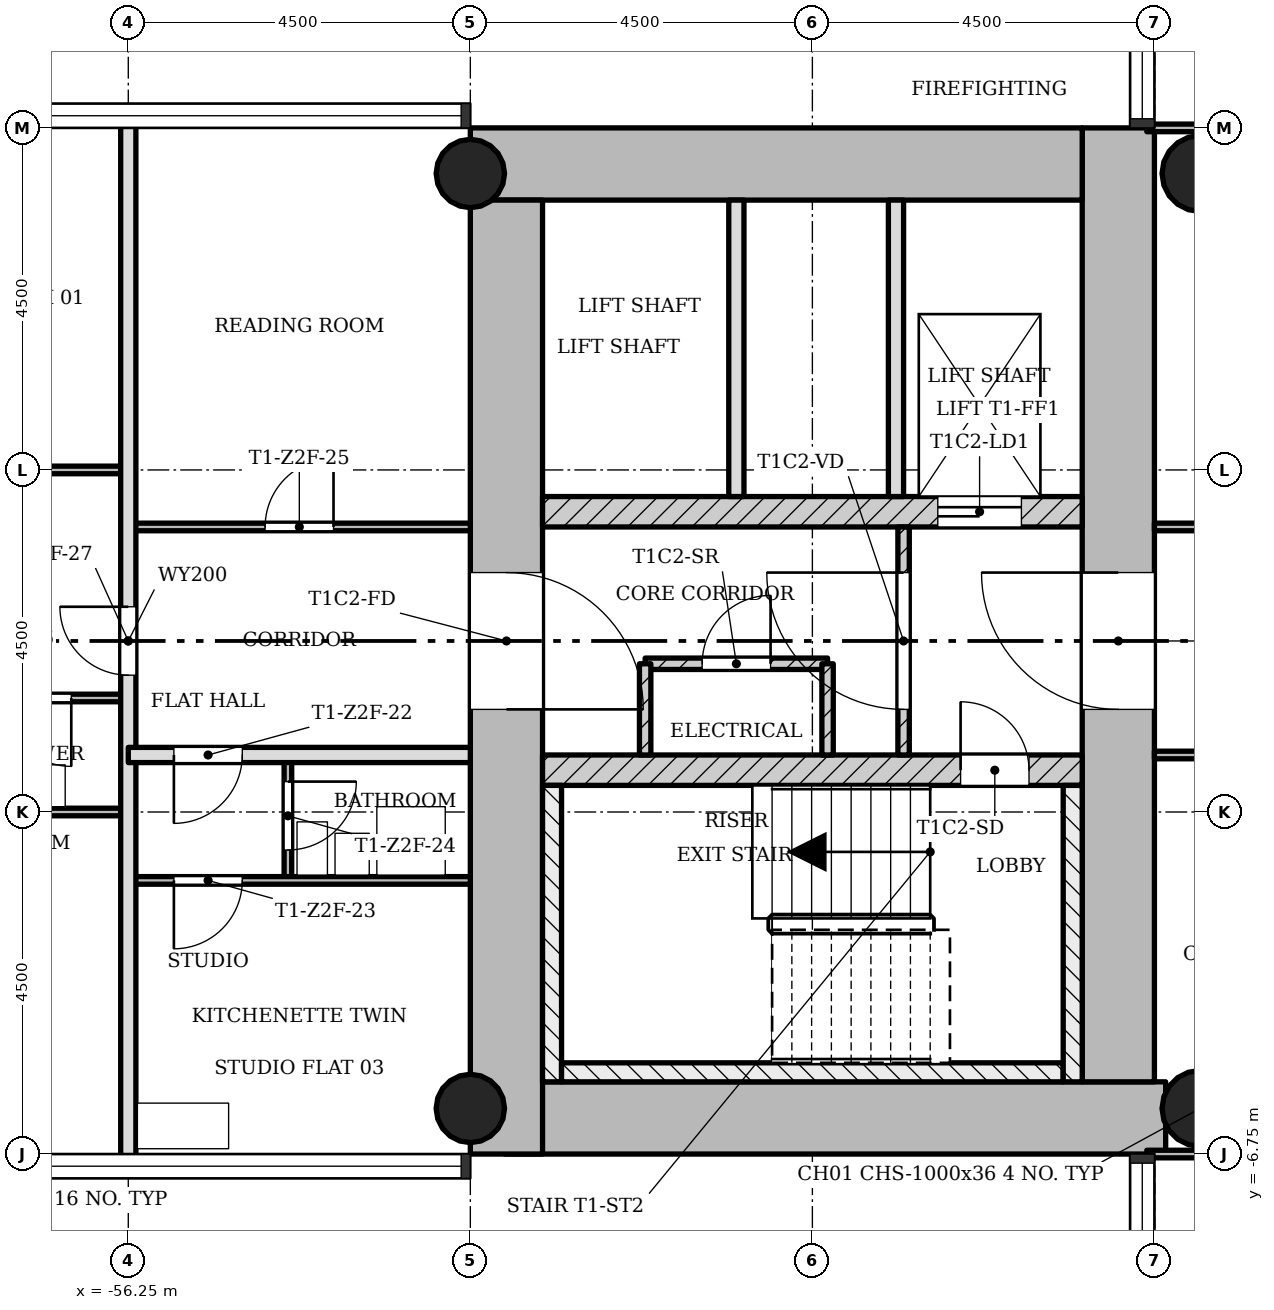
"""IFC4 building model, lengths in metres.
Left out: names, types, materials, properties, quantities, classifications, styles, units other than length and angle.
Written with IfcOpenShell. Run it as: python <this file> out.ifc"""

import sys

from ifc_helpers import new_model, si_unit, direction, frame, frame_2d, origin, origin_2d, place, context, subcontext, project, spatial, rectangle, hollow_circle, extrude, element, fill, save


model = new_model("IFC4")
c1 = context("Model", 3, precision=1e-05, world=origin(), true_north=direction((0.0, 1.0)))
c2 = subcontext(c1, "Body", "Model", "MODEL_VIEW")
j1 = project(units=[si_unit("LENGTHUNIT", "METRE"), si_unit("PLANEANGLEUNIT", "RADIAN")], contexts=[c1])
p1 = place(None, origin())
s1 = spatial("IfcSite", under=j1, at=p1, CompositionType="ELEMENT")
p2 = place(p1, origin())
s2 = spatial("IfcBuilding", under=s1, at=p2, CompositionType="ELEMENT")
p3 = place(p2, frame((0.0, 0.0, 110.6)))
s3 = spatial("IfcBuildingStorey", under=s2, at=p3, CompositionType="ELEMENT", Elevation=110.6)
p4 = place(p3, frame((-51.298, -6.275, 0.0), z_axis=(0.0, 0.0, 1.0), x_axis=(1.0, 0.0, 0.0)))
e1 = element("IfcWall", 1, at=p4, inside=s3, PredefinedType="SHEAR", context=c2, shape_type="SweptSolid", body=[
    extrude(rectangle(XDim=8.696, YDim=0.95, at=frame_2d((4.348, 0.0))), origin(), (0.0, 0.0, 1.0), 3.4),
])
p5 = place(p3, frame((-43.225, -5.8, 0.0), z_axis=(0.0, 0.0, 1.0), x_axis=(0.0, 1.0, 0.0)))
e2 = element("IfcWall", 2, at=p5, inside=s3, PredefinedType="SHEAR", context=c2, shape_type="SweptSolid", body=[
    extrude(rectangle(XDim=12.55, YDim=0.95, at=frame_2d((6.275, 0.0))), origin(), (0.0, 0.0, 1.0), 3.4),
])
p6 = place(p5, frame((4.9, 0.0, 0.0)))
e3 = element("IfcOpeningElement", 3, at=p6, cuts=e2, PredefinedType="OPENING", context=c2, shape_type="SweptSolid", body=[
    extrude(rectangle(XDim=1.8, YDim=2.1, at=frame_2d((0.9, 1.05))), frame((0.0, 0.485, 0.0), z_axis=(0.0, -1.0, 0.0), x_axis=(1.0, 0.0, 0.0)), (0.0, 0.0, 1.0), 0.97),
])
p7 = place(p3, frame((-43.7, 6.275, 0.0), z_axis=(0.0, 0.0, 1.0), x_axis=(-1.0, 0.0, 0.0)))
e4 = element("IfcWall", 4, at=p7, inside=s3, PredefinedType="SHEAR", context=c2, shape_type="SweptSolid", body=[
    extrude(rectangle(XDim=8.05, YDim=0.95, at=frame_2d((4.025, 0.0))), origin(), (0.0, 0.0, 1.0), 3.4),
])
p8 = place(p3, frame((-51.275, 5.8, 0.0), z_axis=(0.0, 0.0, 1.0), x_axis=(0.0, -1.0, 0.0)))
e5 = element("IfcWall", 5, at=p8, inside=s3, PredefinedType="SHEAR", context=c2, shape_type="SweptSolid", body=[
    extrude(rectangle(XDim=12.55, YDim=0.95, at=frame_2d((6.275, 0.0))), origin(), (0.0, 0.0, 1.0), 3.4),
])
p9 = place(p8, frame((4.9, 0.0, 0.0)))
e6 = element("IfcOpeningElement", 6, at=p9, cuts=e5, PredefinedType="OPENING", context=c2, shape_type="SweptSolid", body=[
    extrude(rectangle(XDim=1.8, YDim=2.1, at=frame_2d((0.9, 1.05))), frame((0.0, 0.485, 0.0), z_axis=(0.0, -1.0, 0.0), x_axis=(1.0, 0.0, 0.0)), (0.0, 0.0, 1.0), 0.97),
])
p10 = place(p3, frame((-50.8, -1.7, 0.0), z_axis=(0.0, 0.0, 1.0), x_axis=(1.0, 0.0, 0.0)))
e7 = element("IfcWall", 7, at=p10, inside=s3, PredefinedType="SHEAR", context=c2, shape_type="SweptSolid", body=[
    extrude(rectangle(XDim=7.1, YDim=0.4, at=frame_2d((3.55, 0.0))), origin(), (0.0, 0.0, 1.0), 3.4),
])
p11 = place(p10, frame((5.5, 0.0, 0.0)))
e8 = element("IfcOpeningElement", 8, at=p11, cuts=e7, PredefinedType="OPENING", context=c2, shape_type="SweptSolid", body=[
    extrude(rectangle(XDim=0.9, YDim=2.1, at=frame_2d((0.45, 1.05))), frame((0.0, 0.21, 0.0), z_axis=(0.0, -1.0, 0.0), x_axis=(1.0, 0.0, 0.0)), (0.0, 0.0, 1.0), 0.42),
])
p12 = place(p3, frame((-50.8, 1.7, 0.0), z_axis=(0.0, 0.0, 1.0), x_axis=(1.0, 0.0, 0.0)))
e9 = element("IfcWall", 9, at=p12, inside=s3, PredefinedType="SHEAR", context=c2, shape_type="SweptSolid", body=[
    extrude(rectangle(XDim=7.1, YDim=0.4, at=frame_2d((3.55, 0.0))), origin(), (0.0, 0.0, 1.0), 3.4),
])
p13 = place(p12, frame((5.2, 0.0, 0.0)))
e10 = element("IfcOpeningElement", 10, at=p13, cuts=e9, PredefinedType="OPENING", context=c2, shape_type="SweptSolid", body=[
    extrude(rectangle(XDim=1.1, YDim=2.1, at=frame_2d((0.55, 1.05))), frame((0.0, 0.21, 0.0), z_axis=(0.0, -1.0, 0.0), x_axis=(1.0, 0.0, 0.0)), (0.0, 0.0, 1.0), 0.42),
])
for number, where, z_axis, x_axis in (
    (11, (-51.75, -6.15, 0.0), (0.0, 0.0, 1.0), (1.0, 0.0, 0.0)),
    (12, (-51.75, 6.15, 0.0), (0.0, 0.0, 1.0), (1.0, 0.0, 0.0)),
):
    element("IfcColumn", number, at=place(p3, frame(where, z_axis=z_axis, x_axis=x_axis)), inside=s3, PredefinedType="COLUMN", context=c2, shape_type="SweptSolid", body=[
        extrude(hollow_circle(Radius=0.45, WallThickness=0.032, at=origin_2d()), origin(), (0.0, 0.0, 1.0), 3.4),
    ])
for number, where, z_axis, x_axis in (
    (13, (-42.15, -6.15, 0.0), (0.0, 0.0, 1.0), (1.0, 0.0, 0.0)),
    (14, (-42.15, 6.15, 0.0), (0.0, 0.0, 1.0), (1.0, 0.0, 0.0)),
):
    element("IfcColumn", number, at=place(p3, frame(where, z_axis=z_axis, x_axis=x_axis)), inside=s3, PredefinedType="COLUMN", context=c2, shape_type="SweptSolid", body=[
        extrude(hollow_circle(Radius=0.5, WallThickness=0.036, at=origin_2d()), origin(), (0.0, 0.0, 1.0), 3.4),
    ])
p14 = place(p3, frame((-46.05, 1.5, 0.0), z_axis=(0.0, 0.0, 1.0), x_axis=(0.0, -1.0, 0.0)))
e15 = element("IfcWall", 15, at=p14, inside=s3, PredefinedType="PARTITIONING", context=c2, shape_type="SweptSolid", body=[
    extrude(rectangle(XDim=3.0, YDim=0.15, at=frame_2d((1.5, 0.0))), origin(), (0.0, 0.0, 1.0), 3.0),
])
p15 = place(p14, frame((0.6, 0.0, 0.0)))
e16 = element("IfcOpeningElement", 16, at=p15, cuts=e15, PredefinedType="OPENING", context=c2, shape_type="SweptSolid", body=[
    extrude(rectangle(XDim=1.8, YDim=2.1, at=frame_2d((0.9, 1.05))), frame((0.0, 0.085, 0.0), z_axis=(0.0, -1.0, 0.0), x_axis=(1.0, 0.0, 0.0)), (0.0, 0.0, 1.0), 0.17),
])
for number, where, z_axis, x_axis in (
    (17, (-46.15, 5.8, 0.0), (0.0, 0.0, 1.0), (0.0, -1.0, 0.0)),
    (18, (-48.25, 5.8, 0.0), (0.0, 0.0, 1.0), (0.0, -1.0, 0.0)),
):
    element("IfcWall", number, at=place(p3, frame(where, z_axis=z_axis, x_axis=x_axis)), inside=s3, PredefinedType="SOLIDWALL", context=c2, shape_type="SweptSolid", body=[
        extrude(rectangle(XDim=3.9, YDim=0.2, at=frame_2d((1.95, 0.0))), origin(), (0.0, 0.0, 1.0), 3.0),
    ])
p16 = place(p3, frame((-47.05, -0.3, 0.0), z_axis=(0.0, 0.0, 1.0), x_axis=(-1.0, 0.0, 0.0)))
e19 = element("IfcWall", 19, at=p16, inside=s3, PredefinedType="PARTITIONING", context=c2, shape_type="SweptSolid", body=[
    extrude(rectangle(XDim=2.4, YDim=0.15, at=frame_2d((1.2, 0.0))), origin(), (0.0, 0.0, 1.0), 3.0),
])
p17 = place(p16, frame((0.75, 0.0, 0.0)))
e20 = element("IfcOpeningElement", 20, at=p17, cuts=e19, PredefinedType="OPENING", context=c2, shape_type="SweptSolid", body=[
    extrude(rectangle(XDim=0.9, YDim=2.1, at=frame_2d((0.45, 1.05))), frame((0.0, 0.085, 0.0), z_axis=(0.0, -1.0, 0.0), x_axis=(1.0, 0.0, 0.0)), (0.0, 0.0, 1.0), 0.17),
])
for number, where, z_axis, x_axis in (
    (21, (-47.05, -0.3, 0.0), (0.0, 0.0, 1.0), (0.0, -1.0, 0.0)),
    (22, (-49.45, -0.3, 0.0), (0.0, 0.0, 1.0), (0.0, -1.0, 0.0)),
):
    element("IfcWall", number, at=place(p3, frame(where, z_axis=z_axis, x_axis=x_axis)), inside=s3, PredefinedType="PARTITIONING", context=c2, shape_type="SweptSolid", body=[
        extrude(rectangle(XDim=1.2, YDim=0.15, at=frame_2d((0.6, 0.0))), origin(), (0.0, 0.0, 1.0), 3.0),
    ])
p18 = place(p3, frame((-56.25, -6.85, 0.0), z_axis=(0.0, 0.0, 1.0), x_axis=(0.0, 1.0, 0.0)))
e23 = element("IfcWall", 23, at=p18, inside=s3, PredefinedType="SOLIDWALL", context=c2, shape_type="SweptSolid", body=[
    extrude(rectangle(XDim=13.7, YDim=0.2, at=frame_2d((6.85, 0.0))), origin(), (0.0, 0.0, 1.0), 3.0),
])
p19 = place(p18, frame((6.4, 0.0, 0.0)))
e24 = element("IfcOpeningElement", 24, at=p19, cuts=e23, PredefinedType="OPENING", context=c2, shape_type="SweptSolid", body=[
    extrude(rectangle(XDim=0.9, YDim=2.1, at=frame_2d((0.45, 1.05))), frame((0.0, 0.11, 0.0), z_axis=(0.0, -1.0, 0.0), x_axis=(1.0, 0.0, 0.0)), (0.0, 0.0, 1.0), 0.22),
])
p20 = place(p3, frame((-54.15, -3.15, 0.0), z_axis=(0.0, 0.0, 1.0), x_axis=(0.0, 1.0, 0.0)))
e25 = element("IfcWall", 25, at=p20, inside=s3, PredefinedType="PARTITIONING", context=c2, shape_type="SweptSolid", body=[
    extrude(rectangle(XDim=1.65, YDim=0.1, at=frame_2d((0.825, 0.0))), origin(), (0.0, 0.0, 1.0), 3.0),
])
p21 = place(p20, frame((0.4, 0.0, 0.0)))
e26 = element("IfcOpeningElement", 26, at=p21, cuts=e25, PredefinedType="OPENING", context=c2, shape_type="SweptSolid", body=[
    extrude(rectangle(XDim=0.9, YDim=2.1, at=frame_2d((0.45, 1.05))), frame((0.0, 0.06, 0.0), z_axis=(0.0, -1.0, 0.0), x_axis=(1.0, 0.0, 0.0)), (0.0, 0.0, 1.0), 0.12),
])
p22 = place(p3, frame((-42.85, -6.75, 0.0), z_axis=(0.0, 0.0, 1.0), x_axis=(1.0, 0.0, 0.0)))
e27 = element("IfcWall", 27, at=p22, inside=s3, PredefinedType="PARTITIONING", context=c2, shape_type="SweptSolid", body=[
    extrude(rectangle(XDim=5.95, YDim=0.1, at=frame_2d((2.975, 0.0))), origin(), (0.0, 0.0, 1.0), 3.0),
])
p23 = place(p3, frame((-56.25, -3.15, 0.0), z_axis=(0.0, 0.0, 1.0), x_axis=(1.0, 0.0, 0.0)))
e28 = element("IfcWall", 28, at=p23, inside=s3, PredefinedType="PARTITIONING", context=c2, shape_type="SweptSolid", body=[
    extrude(rectangle(XDim=4.5, YDim=0.1, at=frame_2d((2.25, 0.0))), origin(), (0.0, 0.0, 1.0), 3.0),
])
p24 = place(p23, frame((0.6, 0.0, 0.0)))
e29 = element("IfcOpeningElement", 29, at=p24, cuts=e28, PredefinedType="OPENING", context=c2, shape_type="SweptSolid", body=[
    extrude(rectangle(XDim=0.9, YDim=2.1, at=frame_2d((0.45, 1.05))), frame((0.0, 0.06, 0.0), z_axis=(0.0, -1.0, 0.0), x_axis=(1.0, 0.0, 0.0)), (0.0, 0.0, 1.0), 0.12),
])
p25 = place(p3, frame((-60.85, -2.25, 0.0), z_axis=(0.0, 0.0, 1.0), x_axis=(1.0, 0.0, 0.0)))
e30 = element("IfcWall", 30, at=p25, inside=s3, PredefinedType="PARTITIONING", context=c2, shape_type="SweptSolid", body=[
    extrude(rectangle(XDim=4.6, YDim=0.1, at=frame_2d((2.3, 0.0))), origin(), (0.0, 0.0, 1.0), 3.0),
])
p26 = place(p25, frame((1.25, 0.0, 0.0)))
e31 = element("IfcOpeningElement", 31, at=p26, cuts=e30, PredefinedType="OPENING", context=c2, shape_type="SweptSolid", body=[
    extrude(rectangle(XDim=0.9, YDim=2.1, at=frame_2d((0.45, 1.05))), frame((0.0, 0.06, 0.0), z_axis=(0.0, -1.0, 0.0), x_axis=(1.0, 0.0, 0.0)), (0.0, 0.0, 1.0), 0.12),
])
p27 = place(p3, frame((-42.75, -1.5, 0.0), z_axis=(0.0, 0.0, 1.0), x_axis=(1.0, 0.0, 0.0)))
e32 = element("IfcWall", 32, at=p27, inside=s3, PredefinedType="PARTITIONING", context=c2, shape_type="SweptSolid", body=[
    extrude(rectangle(XDim=5.85, YDim=0.1, at=frame_2d((2.925, 0.0))), origin(), (0.0, 0.0, 1.0), 3.0),
])
p28 = place(p27, frame((0.975, 0.0, 0.0)))
e33 = element("IfcOpeningElement", 33, at=p28, cuts=e32, PredefinedType="OPENING", context=c2, shape_type="SweptSolid", body=[
    extrude(rectangle(XDim=0.9, YDim=2.1, at=frame_2d((0.45, 1.05))), frame((0.0, 0.06, 0.0), z_axis=(0.0, -1.0, 0.0), x_axis=(1.0, 0.0, 0.0)), (0.0, 0.0, 1.0), 0.12),
])
p29 = place(p3, frame((-56.25, -1.5, 0.0), z_axis=(0.0, 0.0, 1.0), x_axis=(1.0, 0.0, 0.0)))
e34 = element("IfcWall", 34, at=p29, inside=s3, PredefinedType="SOLIDWALL", context=c2, shape_type="SweptSolid", body=[
    extrude(rectangle(XDim=4.5, YDim=0.2, at=frame_2d((2.25, 0.0))), origin(), (0.0, 0.0, 1.0), 3.0),
])
p30 = place(p29, frame((0.6, 0.0, 0.0)))
e35 = element("IfcOpeningElement", 35, at=p30, cuts=e34, PredefinedType="OPENING", context=c2, shape_type="SweptSolid", body=[
    extrude(rectangle(XDim=0.9, YDim=2.1, at=frame_2d((0.45, 1.05))), frame((0.0, 0.11, 0.0), z_axis=(0.0, -1.0, 0.0), x_axis=(1.0, 0.0, 0.0)), (0.0, 0.0, 1.0), 0.22),
])
p31 = place(p3, frame((-58.65, -0.75, 0.0), z_axis=(0.0, 0.0, 1.0), x_axis=(1.0, 0.0, 0.0)))
e36 = element("IfcWall", 36, at=p31, inside=s3, PredefinedType="PARTITIONING", context=c2, shape_type="SweptSolid", body=[
    extrude(rectangle(XDim=2.4, YDim=0.1, at=frame_2d((1.2, 0.0))), origin(), (0.0, 0.0, 1.0), 3.0),
])
p32 = place(p31, frame((0.75, 0.0, 0.0)))
e37 = element("IfcOpeningElement", 37, at=p32, cuts=e36, PredefinedType="OPENING", context=c2, shape_type="SweptSolid", body=[
    extrude(rectangle(XDim=0.9, YDim=2.1, at=frame_2d((0.45, 1.05))), frame((0.0, 0.06, 0.0), z_axis=(0.0, -1.0, 0.0), x_axis=(1.0, 0.0, 0.0)), (0.0, 0.0, 1.0), 0.12),
])
p33 = place(p3, frame((-56.25, 1.5, 0.0), z_axis=(0.0, 0.0, 1.0), x_axis=(1.0, 0.0, 0.0)))
e38 = element("IfcWall", 38, at=p33, inside=s3, PredefinedType="PARTITIONING", context=c2, shape_type="SweptSolid", body=[
    extrude(rectangle(XDim=4.5, YDim=0.1, at=frame_2d((2.25, 0.0))), origin(), (0.0, 0.0, 1.0), 3.0),
])
p34 = place(p33, frame((1.8, 0.0, 0.0)))
e39 = element("IfcOpeningElement", 39, at=p34, cuts=e38, PredefinedType="OPENING", context=c2, shape_type="SweptSolid", body=[
    extrude(rectangle(XDim=0.9, YDim=2.1, at=frame_2d((0.45, 1.05))), frame((0.0, 0.06, 0.0), z_axis=(0.0, -1.0, 0.0), x_axis=(1.0, 0.0, 0.0)), (0.0, 0.0, 1.0), 0.12),
])
p35 = place(p3, frame((-42.75, 1.5, 0.0), z_axis=(0.0, 0.0, 1.0), x_axis=(1.0, 0.0, 0.0)))
e40 = element("IfcWall", 40, at=p35, inside=s3, PredefinedType="PARTITIONING", context=c2, shape_type="SweptSolid", body=[
    extrude(rectangle(XDim=5.85, YDim=0.1, at=frame_2d((2.925, 0.0))), origin(), (0.0, 0.0, 1.0), 3.0),
])
p36 = place(p35, frame((1.575, 0.0, 0.0)))
e41 = element("IfcOpeningElement", 41, at=p36, cuts=e40, PredefinedType="OPENING", context=c2, shape_type="SweptSolid", body=[
    extrude(rectangle(XDim=0.9, YDim=2.1, at=frame_2d((0.45, 1.05))), frame((0.0, 0.06, 0.0), z_axis=(0.0, -1.0, 0.0), x_axis=(1.0, 0.0, 0.0)), (0.0, 0.0, 1.0), 0.12),
])
p37 = place(p3, frame((-60.85, 2.25, 0.0), z_axis=(0.0, 0.0, 1.0), x_axis=(1.0, 0.0, 0.0)))
e42 = element("IfcWall", 42, at=p37, inside=s3, PredefinedType="PARTITIONING", context=c2, shape_type="SweptSolid", body=[
    extrude(rectangle(XDim=4.6, YDim=0.1, at=frame_2d((2.3, 0.0))), origin(), (0.0, 0.0, 1.0), 3.0),
])
p38 = place(p37, frame((1.9, 0.0, 0.0)))
e43 = element("IfcOpeningElement", 43, at=p38, cuts=e42, PredefinedType="OPENING", context=c2, shape_type="SweptSolid", body=[
    extrude(rectangle(XDim=0.9, YDim=2.1, at=frame_2d((0.45, 1.05))), frame((0.0, 0.06, 0.0), z_axis=(0.0, -1.0, 0.0), x_axis=(1.0, 0.0, 0.0)), (0.0, 0.0, 1.0), 0.12),
])
p39 = place(p3, frame((-42.85, 6.75, 0.0), z_axis=(0.0, 0.0, 1.0), x_axis=(1.0, 0.0, 0.0)))
e44 = element("IfcWall", 44, at=p39, inside=s3, PredefinedType="PARTITIONING", context=c2, shape_type="SweptSolid", body=[
    extrude(rectangle(XDim=5.95, YDim=0.1, at=frame_2d((2.975, 0.0))), origin(), (0.0, 0.0, 1.0), 3.0),
])
p40 = place(p3, frame((-50.675, -1.9, 0.0), z_axis=(0.0, 0.0, 1.0), x_axis=(0.0, -1.0, 0.0)))
e45 = element("IfcWall", 45, at=p40, inside=s3, PredefinedType="SHEAR", context=c2, shape_type="SweptSolid", body=[
    extrude(rectangle(XDim=3.9, YDim=0.25, at=frame_2d((1.95, 0.0))), origin(), (0.0, 0.0, 1.0), 3.4),
])
p41 = place(p3, frame((-43.95, -5.675, 0.0), z_axis=(0.0, 0.0, 1.0), x_axis=(-1.0, 0.0, 0.0)))
e46 = element("IfcWall", 46, at=p41, inside=s3, PredefinedType="SHEAR", context=c2, shape_type="SweptSolid", body=[
    extrude(rectangle(XDim=6.6, YDim=0.25, at=frame_2d((3.3, 0.0))), origin(), (0.0, 0.0, 1.0), 3.4),
])
p42 = place(p3, frame((-43.825, -1.9, 0.0), z_axis=(0.0, 0.0, 1.0), x_axis=(0.0, -1.0, 0.0)))
e47 = element("IfcWall", 47, at=p42, inside=s3, PredefinedType="SHEAR", context=c2, shape_type="SweptSolid", body=[
    extrude(rectangle(XDim=3.9, YDim=0.25, at=frame_2d((1.95, 0.0))), origin(), (0.0, 0.0, 1.0), 3.4),
])
p43 = place(p15, origin())
e48 = element("IfcDoor", 48, at=p43, inside=s3, OperationType="SINGLE_SWING_LEFT", PredefinedType="DOOR", context=c2, shape_type="SweptSolid", body=[
    extrude(rectangle(XDim=1.8, YDim=2.1, at=frame_2d((0.9, 1.05))), frame((0.0, 0.025, 0.0), z_axis=(0.0, -1.0, 0.0), x_axis=(1.0, 0.0, 0.0)), (0.0, 0.0, 1.0), 0.05),
])
fill(e16, e48)
p44 = place(p17, origin())
e49 = element("IfcDoor", 49, at=p44, inside=s3, OperationType="SINGLE_SWING_LEFT", PredefinedType="DOOR", context=c2, shape_type="SweptSolid", body=[
    extrude(rectangle(XDim=0.9, YDim=2.1, at=frame_2d((0.45, 1.05))), frame((0.0, 0.025, 0.0), z_axis=(0.0, -1.0, 0.0), x_axis=(1.0, 0.0, 0.0)), (0.0, 0.0, 1.0), 0.05),
])
fill(e20, e49)
p45 = place(p30, origin())
e50 = element("IfcDoor", 50, at=p45, inside=s3, OperationType="SINGLE_SWING_LEFT", PredefinedType="DOOR", context=c2, shape_type="SweptSolid", body=[
    extrude(rectangle(XDim=0.9, YDim=2.1, at=frame_2d((0.45, 1.05))), frame((0.0, 0.025, 0.0), z_axis=(0.0, -1.0, 0.0), x_axis=(1.0, 0.0, 0.0)), (0.0, 0.0, 1.0), 0.05),
])
fill(e35, e50)
p46 = place(p24, origin())
e51 = element("IfcDoor", 51, at=p46, inside=s3, OperationType="SINGLE_SWING_LEFT", PredefinedType="DOOR", context=c2, shape_type="SweptSolid", body=[
    extrude(rectangle(XDim=0.9, YDim=2.1, at=frame_2d((0.45, 1.05))), frame((0.0, 0.025, 0.0), z_axis=(0.0, -1.0, 0.0), x_axis=(1.0, 0.0, 0.0)), (0.0, 0.0, 1.0), 0.05),
])
fill(e29, e51)
p47 = place(p21, origin())
e52 = element("IfcDoor", 52, at=p47, inside=s3, OperationType="SINGLE_SWING_RIGHT", PredefinedType="DOOR", context=c2, shape_type="SweptSolid", body=[
    extrude(rectangle(XDim=0.9, YDim=2.1, at=frame_2d((0.45, 1.05))), frame((0.0, 0.025, 0.0), z_axis=(0.0, -1.0, 0.0), x_axis=(1.0, 0.0, 0.0)), (0.0, 0.0, 1.0), 0.05),
])
fill(e26, e52)
p48 = place(p34, origin())
e53 = element("IfcDoor", 53, at=p48, inside=s3, OperationType="SINGLE_SWING_LEFT", PredefinedType="DOOR", context=c2, shape_type="SweptSolid", body=[
    extrude(rectangle(XDim=0.9, YDim=2.1, at=frame_2d((0.45, 1.05))), frame((0.0, 0.025, 0.0), z_axis=(0.0, -1.0, 0.0), x_axis=(1.0, 0.0, 0.0)), (0.0, 0.0, 1.0), 0.05),
])
fill(e39, e53)
p49 = place(p32, origin())
e54 = element("IfcDoor", 54, at=p49, inside=s3, OperationType="SINGLE_SWING_RIGHT", PredefinedType="DOOR", context=c2, shape_type="SweptSolid", body=[
    extrude(rectangle(XDim=0.9, YDim=2.1, at=frame_2d((0.45, 1.05))), frame((0.0, 0.025, 0.0), z_axis=(0.0, -1.0, 0.0), x_axis=(1.0, 0.0, 0.0)), (0.0, 0.0, 1.0), 0.05),
])
fill(e37, e54)
p50 = place(p19, origin())
e55 = element("IfcDoor", 55, at=p50, inside=s3, OperationType="SINGLE_SWING_LEFT", PredefinedType="DOOR", context=c2, shape_type="SweptSolid", body=[
    extrude(rectangle(XDim=0.9, YDim=2.1, at=frame_2d((0.45, 1.05))), frame((0.0, 0.025, 0.0), z_axis=(0.0, -1.0, 0.0), x_axis=(1.0, 0.0, 0.0)), (0.0, 0.0, 1.0), 0.05),
])
fill(e24, e55)
p51 = place(p11, origin())
e56 = element("IfcDoor", 56, at=p51, inside=s3, OperationType="SINGLE_SWING_RIGHT", PredefinedType="DOOR", context=c2, shape_type="SweptSolid", body=[
    extrude(rectangle(XDim=0.9, YDim=2.1, at=frame_2d((0.45, 1.05))), frame((0.0, 0.025, 0.0), z_axis=(0.0, -1.0, 0.0), x_axis=(1.0, 0.0, 0.0)), (0.0, 0.0, 1.0), 0.05),
])
fill(e8, e56)
p52 = place(p13, origin())
e57 = element("IfcDoor", 57, at=p52, inside=s3, OperationType="SLIDING_TO_LEFT", PredefinedType="DOOR", context=c2, shape_type="SweptSolid", body=[
    extrude(rectangle(XDim=1.1, YDim=2.1, at=frame_2d((0.55, 1.05))), frame((0.0, 0.025, 0.0), z_axis=(0.0, -1.0, 0.0), x_axis=(1.0, 0.0, 0.0)), (0.0, 0.0, 1.0), 0.05),
])
fill(e10, e57)
p53 = place(p6, origin())
e58 = element("IfcDoor", 58, at=p53, inside=s3, OperationType="SINGLE_SWING_LEFT", PredefinedType="DOOR", context=c2, shape_type="SweptSolid", body=[
    extrude(rectangle(XDim=1.8, YDim=2.1, at=frame_2d((0.9, 1.05))), frame((0.0, 0.025, 0.0), z_axis=(0.0, -1.0, 0.0), x_axis=(1.0, 0.0, 0.0)), (0.0, 0.0, 1.0), 0.05),
])
fill(e3, e58)
p54 = place(p9, origin())
e59 = element("IfcDoor", 59, at=p54, inside=s3, OperationType="SINGLE_SWING_LEFT", PredefinedType="DOOR", context=c2, shape_type="SweptSolid", body=[
    extrude(rectangle(XDim=1.8, YDim=2.1, at=frame_2d((0.9, 1.05))), frame((0.0, 0.025, 0.0), z_axis=(0.0, -1.0, 0.0), x_axis=(1.0, 0.0, 0.0)), (0.0, 0.0, 1.0), 0.05),
])
fill(e6, e59)
save(model, sys.argv[1])
